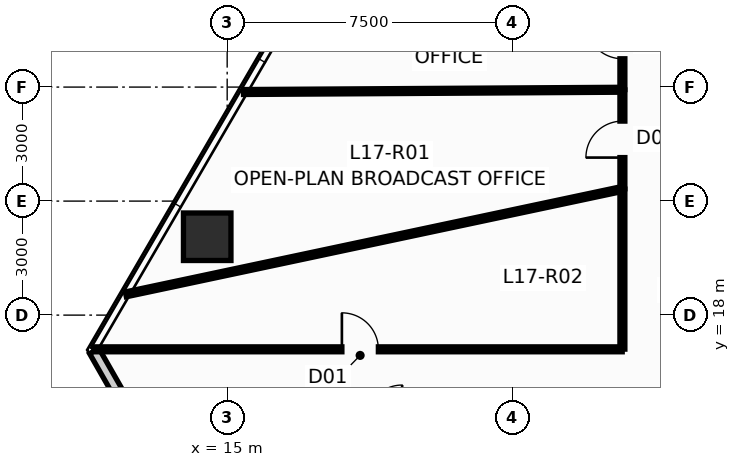
"""IFC4 building model, lengths in metres.
Left out: names, types, materials, properties, quantities, classifications, styles, units other than length and angle.
Written with IfcOpenShell. Run it as: python <this file> out.ifc"""

import sys

from ifc_helpers import new_model, si_unit, direction, frame, frame_2d, origin, origin_2d, place, context, subcontext, project, spatial, rectangle, hollow_rectangle, extrude, source, transform, mapped, element, fill, save


model = new_model("IFC4")
c1 = context("Model", 3, precision=1e-05, world=origin(), true_north=direction((0.0, 1.0)))
c2 = subcontext(c1, "Body", "Model", "MODEL_VIEW")
j1 = project(units=[si_unit("LENGTHUNIT", "METRE"), si_unit("PLANEANGLEUNIT", "RADIAN")], contexts=[c1])
p1 = place(None, origin())
s1 = spatial("IfcSite", under=j1, at=p1, CompositionType="ELEMENT")
p2 = place(p1, origin())
s2 = spatial("IfcBuilding", under=s1, at=p2, CompositionType="ELEMENT")
p3 = place(p2, frame((0.0, 0.0, 67.75)))
s3 = spatial("IfcBuildingStorey", under=s2, at=p3, CompositionType="ELEMENT", Elevation=67.75)
m1 = source(origin(), c2, "Body", "SweptSolid", [
    extrude(hollow_rectangle(XDim=1.25, YDim=1.25, WallThickness=0.07, at=origin_2d()), origin(), (0.0, 0.0, 1.0), 3.651),
])
p4 = place(p3, frame((14.475, 20.062, 0.0), z_axis=(0.010364932146, -0.021532310652, 0.999714423113), x_axis=(0.901042175273, 0.433731481886, 0.0)))
e1 = element("IfcColumn", 1, at=p4, inside=s3, PredefinedType="COLUMN", context=c2, shape_type="MappedRepresentation", body=[
    mapped(m1, transform((0.0, 0.0, 0.0), scale=1.0)),
])
p5 = place(p3, frame((18.621, 4.592, 0.0), z_axis=(0.0, 0.0, 1.0), x_axis=(-0.49597773835, 0.868335236565, 0.0)))
e2 = element("IfcWall", 2, at=p5, inside=s3, PredefinedType="STANDARD", context=c2, shape_type="SweptSolid", body=[
    extrude(rectangle(XDim=14.354, YDim=0.28, at=frame_2d((7.177, 0.0))), origin(), (0.0, 0.0, 1.0), 3.4),
])
p6 = place(p5, frame((6.28, 0.0, 0.9)))
e3 = element("IfcOpeningElement", 3, at=p6, cuts=e2, PredefinedType="OPENING", context=c2, shape_type="SweptSolid", body=[
    extrude(rectangle(XDim=1.8, YDim=1.8, at=frame_2d((0.9, 0.9))), frame((0.0, 0.152, 0.0), z_axis=(0.0, -1.0, 0.0), x_axis=(1.0, 0.0, 0.0)), (0.0, 0.0, 1.0), 0.304),
])
p7 = place(p3, frame((11.492, 17.1, 0.0), z_axis=(0.0, 0.0, 1.0), x_axis=(1.0, 0.0, 0.0)))
e4 = element("IfcWall", 4, at=p7, inside=s3, PredefinedType="PARTITIONING", context=c2, shape_type="SweptSolid", body=[
    extrude(rectangle(XDim=13.903, YDim=0.13, at=frame_2d((6.952, 0.0))), origin(), (0.0, 0.0, 1.0), 3.4),
])
p8 = place(p7, frame((6.527, 0.0, 0.0)))
e5 = element("IfcOpeningElement", 5, at=p8, cuts=e4, PredefinedType="OPENING", context=c2, shape_type="SweptSolid", body=[
    extrude(rectangle(XDim=0.96, YDim=2.15, at=frame_2d((0.48, 1.075))), frame((0.0, 0.077, 0.0), z_axis=(0.0, -1.0, 0.0), x_axis=(1.0, 0.0, 0.0)), (0.0, 0.0, 1.0), 0.154),
])
p9 = place(p3, frame((12.333, 18.546, 0.0), z_axis=(0.0, 0.0, 1.0), x_axis=(0.978200372967, 0.207663261862, 0.0)))
e6 = element("IfcWall", 6, at=p9, inside=s3, PredefinedType="PARTITIONING", context=c2, shape_type="SweptSolid", body=[
    extrude(rectangle(XDim=13.353, YDim=0.13, at=frame_2d((6.677, 0.0))), origin(), (0.0, 0.0, 1.0), 2.783),
])
p10 = place(p3, frame((15.431, 23.871, 0.0), z_axis=(0.0, 0.0, 1.0), x_axis=(0.999982275501, 0.005953879718, 0.0)))
e7 = element("IfcWall", 7, at=p10, inside=s3, PredefinedType="PARTITIONING", context=c2, shape_type="SweptSolid", body=[
    extrude(rectangle(XDim=9.964, YDim=0.13, at=frame_2d((4.982, 0.0))), origin(), (0.0, 0.0, 1.0), 3.4),
])
p11 = place(p3, frame((25.4, 17.105, 0.0), z_axis=(0.0, 0.0, 1.0), x_axis=(0.0, 1.0, 0.0)))
e8 = element("IfcWall", 8, at=p11, inside=s3, PredefinedType="PARTITIONING", context=c2, shape_type="SweptSolid", body=[
    extrude(rectangle(XDim=4.21, YDim=0.13, at=frame_2d((2.105, 0.0))), origin(), (0.0, 0.0, 1.0), 3.4),
])
p12 = place(p3, frame((25.4, 21.325, 0.0), z_axis=(0.0, 0.0, 1.0), x_axis=(0.0, 1.0, 0.0)))
e9 = element("IfcWall", 9, at=p12, inside=s3, PredefinedType="PARTITIONING", context=c2, shape_type="SweptSolid", body=[
    extrude(rectangle(XDim=2.6, YDim=0.13, at=frame_2d((1.3, 0.0))), origin(), (0.0, 0.0, 1.0), 3.4),
])
p13 = place(p12, frame((0.82, 0.0, 0.0)))
e10 = element("IfcOpeningElement", 10, at=p13, cuts=e9, PredefinedType="OPENING", context=c2, shape_type="SweptSolid", body=[
    extrude(rectangle(XDim=0.96, YDim=2.15, at=frame_2d((0.48, 1.075))), frame((0.0, 0.077, 0.0), z_axis=(0.0, -1.0, 0.0), x_axis=(1.0, 0.0, 0.0)), (0.0, 0.0, 1.0), 0.154),
])
p14 = place(p3, frame((25.4, 23.935, 0.0), z_axis=(0.0, 0.0, 1.0), x_axis=(0.0, 1.0, 0.0)))
e11 = element("IfcWall", 11, at=p14, inside=s3, PredefinedType="PARTITIONING", context=c2, shape_type="SweptSolid", body=[
    extrude(rectangle(XDim=2.58, YDim=0.13, at=frame_2d((1.29, 0.0))), origin(), (0.0, 0.0, 1.0), 3.026),
])
p15 = place(p14, frame((0.81, 0.0, 0.0)))
e12 = element("IfcOpeningElement", 12, at=p15, cuts=e11, PredefinedType="OPENING", context=c2, shape_type="SweptSolid", body=[
    extrude(rectangle(XDim=0.96, YDim=2.15, at=frame_2d((0.48, 1.075))), frame((0.0, 0.077, 0.0), z_axis=(0.0, -1.0, 0.0), x_axis=(1.0, 0.0, 0.0)), (0.0, 0.0, 1.0), 0.154),
])
p16 = place(p8, origin())
e13 = element("IfcDoor", 13, at=p16, inside=s3, OperationType="SINGLE_SWING_LEFT", PredefinedType="DOOR", context=c2, shape_type="SweptSolid", body=[
    extrude(rectangle(XDim=0.96, YDim=2.15, at=frame_2d((0.48, 1.075))), frame((0.0, 0.025, 0.0), z_axis=(0.0, -1.0, 0.0), x_axis=(1.0, 0.0, 0.0)), (0.0, 0.0, 1.0), 0.05),
])
fill(e5, e13)
p17 = place(p13, origin())
e14 = element("IfcDoor", 14, at=p17, inside=s3, OperationType="SINGLE_SWING_LEFT", PredefinedType="DOOR", context=c2, shape_type="SweptSolid", body=[
    extrude(rectangle(XDim=0.96, YDim=2.15, at=frame_2d((0.48, 1.075))), frame((0.0, 0.025, 0.0), z_axis=(0.0, -1.0, 0.0), x_axis=(1.0, 0.0, 0.0)), (0.0, 0.0, 1.0), 0.05),
])
fill(e10, e14)
p18 = place(p15, origin())
e15 = element("IfcDoor", 15, at=p18, inside=s3, OperationType="SINGLE_SWING_RIGHT", PredefinedType="DOOR", context=c2, shape_type="SweptSolid", body=[
    extrude(rectangle(XDim=0.96, YDim=2.15, at=frame_2d((0.48, 1.075))), frame((0.0, 0.025, 0.0), z_axis=(0.0, -1.0, 0.0), x_axis=(1.0, 0.0, 0.0)), (0.0, 0.0, 1.0), 0.05),
])
fill(e12, e15)
save(model, sys.argv[1])
